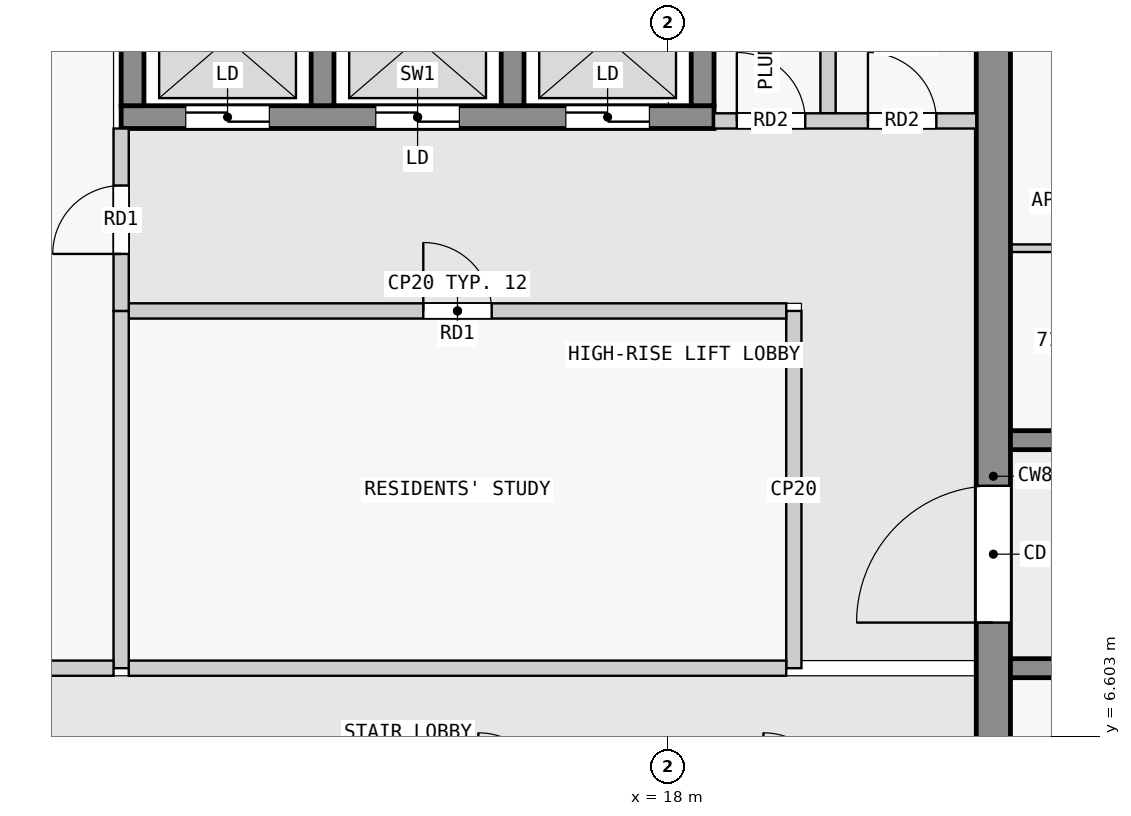
"""IFC4 building model, lengths in metres.
Left out: names, types, materials, properties, quantities, classifications, styles, units other than length and angle.
Written with IfcOpenShell. Run it as: python <this file> out.ifc"""

import sys

from ifc_helpers import new_model, si_unit, direction, frame, frame_2d, origin, place, context, subcontext, project, spatial, rectangle, extrude, element, fill, save


model = new_model("IFC4")
c1 = context("Model", 3, precision=1e-05, world=origin(), true_north=direction((0.0, 1.0)))
c2 = subcontext(c1, "Body", "Model", "MODEL_VIEW")
j1 = project(units=[si_unit("LENGTHUNIT", "METRE"), si_unit("PLANEANGLEUNIT", "RADIAN")], contexts=[c1])
p1 = place(None, origin())
s1 = spatial("IfcSite", under=j1, at=p1, CompositionType="ELEMENT")
p2 = place(p1, origin())
s2 = spatial("IfcBuilding", under=s1, at=p2, CompositionType="ELEMENT")
p3 = place(p2, frame((0.0, 0.0, 270.4)))
s3 = spatial("IfcBuildingStorey", under=s2, at=p3, CompositionType="ELEMENT", Elevation=270.4)
p4 = place(p3, frame((22.275, 2.5, 0.0), z_axis=(0.0, 0.0, 1.0), x_axis=(0.0, 1.0, 0.0)))
e1 = element("IfcWall", 1, at=p4, inside=s3, PredefinedType="SHEAR", context=c2, shape_type="SweptSolid", body=[
    extrude(rectangle(XDim=15.05, YDim=0.45, at=frame_2d((7.525, 0.0))), origin(), (0.0, 0.0, 1.0), 3.25),
])
p5 = place(p4, frame((5.6, 0.0, 0.0)))
e2 = element("IfcOpeningElement", 2, at=p5, cuts=e1, PredefinedType="OPENING", context=c2, shape_type="SweptSolid", body=[
    extrude(rectangle(XDim=1.8, YDim=2.1, at=frame_2d((0.9, 1.05))), frame((0.0, 0.235, 0.0), z_axis=(0.0, -1.0, 0.0), x_axis=(1.0, 0.0, 0.0)), (0.0, 0.0, 1.0), 0.47),
])
p6 = place(p3, frame((10.8, 14.75, 0.0), z_axis=(0.0, 0.0, 1.0), x_axis=(1.0, 0.0, 0.0)))
e3 = element("IfcWall", 3, at=p6, inside=s3, PredefinedType="SHEAR", context=c2, shape_type="SweptSolid", body=[
    extrude(rectangle(XDim=7.8, YDim=0.3, at=frame_2d((3.9, 0.0))), origin(), (0.0, 0.0, 1.0), 3.25),
])
p7 = place(p6, frame((0.85, 0.0, 0.0)))
e4 = element("IfcOpeningElement", 4, at=p7, cuts=e3, PredefinedType="OPENING", context=c2, shape_type="SweptSolid", body=[
    extrude(rectangle(XDim=1.1, YDim=2.1, at=frame_2d((0.55, 1.05))), frame((0.0, 0.16, 0.0), z_axis=(0.0, -1.0, 0.0), x_axis=(1.0, 0.0, 0.0)), (0.0, 0.0, 1.0), 0.32),
])
p8 = place(p6, frame((3.35, 0.0, 0.0)))
e5 = element("IfcOpeningElement", 5, at=p8, cuts=e3, PredefinedType="OPENING", context=c2, shape_type="SweptSolid", body=[
    extrude(rectangle(XDim=1.1, YDim=2.1, at=frame_2d((0.55, 1.05))), frame((0.0, 0.16, 0.0), z_axis=(0.0, -1.0, 0.0), x_axis=(1.0, 0.0, 0.0)), (0.0, 0.0, 1.0), 0.32),
])
p9 = place(p6, frame((5.85, 0.0, 0.0)))
e6 = element("IfcOpeningElement", 6, at=p9, cuts=e3, PredefinedType="OPENING", context=c2, shape_type="SweptSolid", body=[
    extrude(rectangle(XDim=1.1, YDim=2.1, at=frame_2d((0.55, 1.05))), frame((0.0, 0.16, 0.0), z_axis=(0.0, -1.0, 0.0), x_axis=(1.0, 0.0, 0.0)), (0.0, 0.0, 1.0), 0.32),
])
for number, where, z_axis, x_axis in (
    (7, (10.95, 14.9, 0.0), (0.0, 0.0, 1.0), (0.0, 1.0, 0.0)),
    (8, (13.45, 14.9, 0.0), (0.0, 0.0, 1.0), (0.0, 1.0, 0.0)),
    (9, (15.95, 14.9, 0.0), (0.0, 0.0, 1.0), (0.0, 1.0, 0.0)),
    (10, (18.45, 14.9, 0.0), (0.0, 0.0, 1.0), (0.0, 1.0, 0.0)),
):
    element("IfcWall", number, at=place(p3, frame(where, z_axis=z_axis, x_axis=x_axis)), inside=s3, PredefinedType="SHEAR", context=c2, shape_type="SweptSolid", body=[
        extrude(rectangle(XDim=2.0, YDim=0.3, at=frame_2d((1.0, 0.0))), origin(), (0.0, 0.0, 1.0), 3.25),
    ])
p10 = place(p3, frame((22.5, 7.5, 0.0), z_axis=(0.0, 0.0, 1.0), x_axis=(1.0, 0.0, 0.0)))
e11 = element("IfcWall", 11, at=p10, inside=s3, PredefinedType="SHEAR", context=c2, shape_type="SweptSolid", body=[
    extrude(rectangle(XDim=22.5, YDim=0.25, at=frame_2d((11.25, 0.0))), origin(), (0.0, 0.0, 1.0), 3.25),
])
p11 = place(p10, frame((1.75, 0.0, 0.0)))
e12 = element("IfcOpeningElement", 12, at=p11, cuts=e11, PredefinedType="OPENING", context=c2, shape_type="SweptSolid", body=[
    extrude(rectangle(XDim=1.0, YDim=2.1, at=frame_2d((0.5, 1.05))), frame((0.0, 0.135, 0.0), z_axis=(0.0, -1.0, 0.0), x_axis=(1.0, 0.0, 0.0)), (0.0, 0.0, 1.0), 0.27),
])
p12 = place(p10, frame((6.25, 0.0, 0.0)))
e13 = element("IfcOpeningElement", 13, at=p12, cuts=e11, PredefinedType="OPENING", context=c2, shape_type="SweptSolid", body=[
    extrude(rectangle(XDim=1.0, YDim=2.1, at=frame_2d((0.5, 1.05))), frame((0.0, 0.135, 0.0), z_axis=(0.0, -1.0, 0.0), x_axis=(1.0, 0.0, 0.0)), (0.0, 0.0, 1.0), 0.27),
])
p13 = place(p10, frame((10.35, 0.0, 0.0)))
e14 = element("IfcOpeningElement", 14, at=p13, cuts=e11, PredefinedType="OPENING", context=c2, shape_type="SweptSolid", body=[
    extrude(rectangle(XDim=1.8, YDim=2.1, at=frame_2d((0.9, 1.05))), frame((0.0, 0.135, 0.0), z_axis=(0.0, -1.0, 0.0), x_axis=(1.0, 0.0, 0.0)), (0.0, 0.0, 1.0), 0.27),
])
p14 = place(p10, frame((15.25, 0.0, 0.0)))
e15 = element("IfcOpeningElement", 15, at=p14, cuts=e11, PredefinedType="OPENING", context=c2, shape_type="SweptSolid", body=[
    extrude(rectangle(XDim=1.0, YDim=2.1, at=frame_2d((0.5, 1.05))), frame((0.0, 0.135, 0.0), z_axis=(0.0, -1.0, 0.0), x_axis=(1.0, 0.0, 0.0)), (0.0, 0.0, 1.0), 0.27),
])
p15 = place(p10, frame((18.75, 0.0, 0.0)))
e16 = element("IfcOpeningElement", 16, at=p15, cuts=e11, PredefinedType="OPENING", context=c2, shape_type="SweptSolid", body=[
    extrude(rectangle(XDim=0.9, YDim=2.1, at=frame_2d((0.45, 1.05))), frame((0.0, 0.135, 0.0), z_axis=(0.0, -1.0, 0.0), x_axis=(1.0, 0.0, 0.0)), (0.0, 0.0, 1.0), 0.27),
])
p16 = place(p10, frame((20.95, 0.0, 0.0)))
e17 = element("IfcOpeningElement", 17, at=p16, cuts=e11, PredefinedType="OPENING", context=c2, shape_type="SweptSolid", body=[
    extrude(rectangle(XDim=1.0, YDim=2.1, at=frame_2d((0.5, 1.05))), frame((0.0, 0.135, 0.0), z_axis=(0.0, -1.0, 0.0), x_axis=(1.0, 0.0, 0.0)), (0.0, 0.0, 1.0), 0.27),
])
p17 = place(p3, frame((22.5, 10.5, 0.0), z_axis=(0.0, 0.0, 1.0), x_axis=(1.0, 0.0, 0.0)))
e18 = element("IfcWall", 18, at=p17, inside=s3, PredefinedType="SHEAR", context=c2, shape_type="SweptSolid", body=[
    extrude(rectangle(XDim=22.5, YDim=0.25, at=frame_2d((11.25, 0.0))), origin(), (0.0, 0.0, 1.0), 3.25),
])
p18 = place(p17, frame((1.75, 0.0, 0.0)))
e19 = element("IfcOpeningElement", 19, at=p18, cuts=e18, PredefinedType="OPENING", context=c2, shape_type="SweptSolid", body=[
    extrude(rectangle(XDim=1.0, YDim=2.1, at=frame_2d((0.5, 1.05))), frame((0.0, 0.135, 0.0), z_axis=(0.0, -1.0, 0.0), x_axis=(1.0, 0.0, 0.0)), (0.0, 0.0, 1.0), 0.27),
])
p19 = place(p17, frame((8.55, 0.0, 0.0)))
e20 = element("IfcOpeningElement", 20, at=p19, cuts=e18, PredefinedType="OPENING", context=c2, shape_type="SweptSolid", body=[
    extrude(rectangle(XDim=1.0, YDim=2.1, at=frame_2d((0.5, 1.05))), frame((0.0, 0.135, 0.0), z_axis=(0.0, -1.0, 0.0), x_axis=(1.0, 0.0, 0.0)), (0.0, 0.0, 1.0), 0.27),
])
p20 = place(p17, frame((16.85, 0.0, 0.0)))
e21 = element("IfcOpeningElement", 21, at=p20, cuts=e18, PredefinedType="OPENING", context=c2, shape_type="SweptSolid", body=[
    extrude(rectangle(XDim=1.0, YDim=2.1, at=frame_2d((0.5, 1.05))), frame((0.0, 0.135, 0.0), z_axis=(0.0, -1.0, 0.0), x_axis=(1.0, 0.0, 0.0)), (0.0, 0.0, 1.0), 0.27),
])
p21 = place(p3, frame((7.1, 7.5, 0.0), z_axis=(0.0, 0.0, 1.0), x_axis=(1.0, 0.0, 0.0)))
e22 = element("IfcWall", 22, at=p21, inside=s3, PredefinedType="PARTITIONING", context=c2, shape_type="SweptSolid", body=[
    extrude(rectangle(XDim=3.6, YDim=0.2, at=frame_2d((1.8, 0.0))), origin(), (0.0, 0.0, 1.0), 3.25),
])
p22 = place(p3, frame((10.8, 12.2, 0.0), z_axis=(0.0, 0.0, 1.0), x_axis=(0.0, 1.0, 0.0)))
e23 = element("IfcWall", 23, at=p22, inside=s3, PredefinedType="PARTITIONING", context=c2, shape_type="SweptSolid", body=[
    extrude(rectangle(XDim=2.4, YDim=0.2, at=frame_2d((1.2, 0.0))), origin(), (0.0, 0.0, 1.0), 3.25),
])
p23 = place(p22, frame((0.75, 0.0, 0.0)))
e24 = element("IfcOpeningElement", 24, at=p23, cuts=e23, PredefinedType="OPENING", context=c2, shape_type="SweptSolid", body=[
    extrude(rectangle(XDim=0.9, YDim=2.1, at=frame_2d((0.45, 1.05))), frame((0.0, 0.11, 0.0), z_axis=(0.0, -1.0, 0.0), x_axis=(1.0, 0.0, 0.0)), (0.0, 0.0, 1.0), 0.22),
])
p24 = place(p3, frame((10.8, 7.5, 0.0), z_axis=(0.0, 0.0, 1.0), x_axis=(0.0, 1.0, 0.0)))
e25 = element("IfcWall", 25, at=p24, inside=s3, PredefinedType="PARTITIONING", context=c2, shape_type="SweptSolid", body=[
    extrude(rectangle(XDim=4.7, YDim=0.2, at=frame_2d((2.35, 0.0))), origin(), (0.0, 0.0, 1.0), 3.25),
])
p25 = place(p3, frame((10.9, 7.5, 0.0), z_axis=(0.0, 0.0, 1.0), x_axis=(1.0, 0.0, 0.0)))
e26 = element("IfcWall", 26, at=p25, inside=s3, PredefinedType="PARTITIONING", context=c2, shape_type="SweptSolid", body=[
    extrude(rectangle(XDim=8.65, YDim=0.2, at=frame_2d((4.325, 0.0))), origin(), (0.0, 0.0, 1.0), 3.25),
])
p26 = place(p3, frame((19.65, 7.5, 0.0), z_axis=(0.0, 0.0, 1.0), x_axis=(0.0, 1.0, 0.0)))
e27 = element("IfcWall", 27, at=p26, inside=s3, PredefinedType="PARTITIONING", context=c2, shape_type="SweptSolid", body=[
    extrude(rectangle(XDim=4.7, YDim=0.2, at=frame_2d((2.35, 0.0))), origin(), (0.0, 0.0, 1.0), 3.25),
])
p27 = place(p3, frame((10.9, 12.2, 0.0), z_axis=(0.0, 0.0, 1.0), x_axis=(1.0, 0.0, 0.0)))
e28 = element("IfcWall", 28, at=p27, inside=s3, PredefinedType="PARTITIONING", context=c2, shape_type="SweptSolid", body=[
    extrude(rectangle(XDim=8.65, YDim=0.2, at=frame_2d((4.325, 0.0))), origin(), (0.0, 0.0, 1.0), 3.25),
])
p28 = place(p27, frame((3.875, 0.0, 0.0)))
e29 = element("IfcOpeningElement", 29, at=p28, cuts=e28, PredefinedType="OPENING", context=c2, shape_type="SweptSolid", body=[
    extrude(rectangle(XDim=0.9, YDim=2.1, at=frame_2d((0.45, 1.05))), frame((0.0, 0.11, 0.0), z_axis=(0.0, -1.0, 0.0), x_axis=(1.0, 0.0, 0.0)), (0.0, 0.0, 1.0), 0.22),
])
p29 = place(p3, frame((18.6, 14.7, 0.0), z_axis=(0.0, 0.0, 1.0), x_axis=(1.0, 0.0, 0.0)))
e30 = element("IfcWall", 30, at=p29, inside=s3, PredefinedType="PARTITIONING", context=c2, shape_type="SweptSolid", body=[
    extrude(rectangle(XDim=3.45, YDim=0.2, at=frame_2d((1.725, 0.0))), origin(), (0.0, 0.0, 1.0), 3.25),
])
p30 = place(p29, frame((0.3, 0.0, 0.0)))
e31 = element("IfcOpeningElement", 31, at=p30, cuts=e30, PredefinedType="OPENING", context=c2, shape_type="SweptSolid", body=[
    extrude(rectangle(XDim=0.9, YDim=2.1, at=frame_2d((0.45, 1.05))), frame((0.0, 0.11, 0.0), z_axis=(0.0, -1.0, 0.0), x_axis=(1.0, 0.0, 0.0)), (0.0, 0.0, 1.0), 0.22),
])
p31 = place(p29, frame((2.025, 0.0, 0.0)))
e32 = element("IfcOpeningElement", 32, at=p31, cuts=e30, PredefinedType="OPENING", context=c2, shape_type="SweptSolid", body=[
    extrude(rectangle(XDim=0.9, YDim=2.1, at=frame_2d((0.45, 1.05))), frame((0.0, 0.11, 0.0), z_axis=(0.0, -1.0, 0.0), x_axis=(1.0, 0.0, 0.0)), (0.0, 0.0, 1.0), 0.22),
])
p32 = place(p3, frame((20.1, 14.8, 0.0), z_axis=(0.0, 0.0, 1.0), x_axis=(0.0, 1.0, 0.0)))
e33 = element("IfcWall", 33, at=p32, inside=s3, PredefinedType="PARTITIONING", context=c2, shape_type="SweptSolid", body=[
    extrude(rectangle(XDim=2.75, YDim=0.2, at=frame_2d((1.375, 0.0))), origin(), (0.0, 0.0, 1.0), 3.25),
])
p33 = place(p3, frame((23.95, 13.025, 0.0), z_axis=(0.0, 0.0, 1.0), x_axis=(-1.0, 0.0, 0.0)))
e34 = element("IfcWall", 34, at=p33, inside=s3, PredefinedType="PARTITIONING", context=c2, shape_type="SweptSolid", body=[
    extrude(rectangle(XDim=1.45, YDim=0.1, at=frame_2d((0.725, 0.0))), origin(), (0.0, 0.0, 1.0), 3.25),
])
p34 = place(p23, origin())
e35 = element("IfcDoor", 35, at=p34, inside=s3, OperationType="SINGLE_SWING_LEFT", PredefinedType="DOOR", context=c2, shape_type="SweptSolid", body=[
    extrude(rectangle(XDim=0.9, YDim=2.1, at=frame_2d((0.45, 1.05))), frame((0.0, 0.025, 0.0), z_axis=(0.0, -1.0, 0.0), x_axis=(1.0, 0.0, 0.0)), (0.0, 0.0, 1.0), 0.05),
])
fill(e24, e35)
p35 = place(p28, origin())
e36 = element("IfcDoor", 36, at=p35, inside=s3, OperationType="SINGLE_SWING_LEFT", PredefinedType="DOOR", context=c2, shape_type="SweptSolid", body=[
    extrude(rectangle(XDim=0.9, YDim=2.1, at=frame_2d((0.45, 1.05))), frame((0.0, 0.025, 0.0), z_axis=(0.0, -1.0, 0.0), x_axis=(1.0, 0.0, 0.0)), (0.0, 0.0, 1.0), 0.05),
])
fill(e29, e36)
p36 = place(p7, origin())
e37 = element("IfcDoor", 37, at=p36, inside=s3, OperationType="DOUBLE_DOOR_SLIDING", PredefinedType="DOOR", context=c2, shape_type="SweptSolid", body=[
    extrude(rectangle(XDim=1.1, YDim=2.1, at=frame_2d((0.55, 1.05))), frame((0.0, 0.025, 0.0), z_axis=(0.0, -1.0, 0.0), x_axis=(1.0, 0.0, 0.0)), (0.0, 0.0, 1.0), 0.05),
])
fill(e4, e37)
p37 = place(p8, origin())
e38 = element("IfcDoor", 38, at=p37, inside=s3, OperationType="DOUBLE_DOOR_SLIDING", PredefinedType="DOOR", context=c2, shape_type="SweptSolid", body=[
    extrude(rectangle(XDim=1.1, YDim=2.1, at=frame_2d((0.55, 1.05))), frame((0.0, 0.025, 0.0), z_axis=(0.0, -1.0, 0.0), x_axis=(1.0, 0.0, 0.0)), (0.0, 0.0, 1.0), 0.05),
])
fill(e5, e38)
p38 = place(p9, origin())
e39 = element("IfcDoor", 39, at=p38, inside=s3, OperationType="DOUBLE_DOOR_SLIDING", PredefinedType="DOOR", context=c2, shape_type="SweptSolid", body=[
    extrude(rectangle(XDim=1.1, YDim=2.1, at=frame_2d((0.55, 1.05))), frame((0.0, 0.025, 0.0), z_axis=(0.0, -1.0, 0.0), x_axis=(1.0, 0.0, 0.0)), (0.0, 0.0, 1.0), 0.05),
])
fill(e6, e39)
p39 = place(p5, origin())
e40 = element("IfcDoor", 40, at=p39, inside=s3, OperationType="DOUBLE_DOOR_SINGLE_SWING", PredefinedType="DOOR", context=c2, shape_type="SweptSolid", body=[
    extrude(rectangle(XDim=1.8, YDim=2.1, at=frame_2d((0.9, 1.05))), frame((0.0, 0.025, 0.0), z_axis=(0.0, -1.0, 0.0), x_axis=(1.0, 0.0, 0.0)), (0.0, 0.0, 1.0), 0.05),
])
fill(e2, e40)
p40 = place(p30, origin())
e41 = element("IfcDoor", 41, at=p40, inside=s3, OperationType="SINGLE_SWING_LEFT", PredefinedType="DOOR", context=c2, shape_type="SweptSolid", body=[
    extrude(rectangle(XDim=0.9, YDim=2.1, at=frame_2d((0.45, 1.05))), frame((0.0, 0.025, 0.0), z_axis=(0.0, -1.0, 0.0), x_axis=(1.0, 0.0, 0.0)), (0.0, 0.0, 1.0), 0.05),
])
fill(e31, e41)
p41 = place(p31, origin())
e42 = element("IfcDoor", 42, at=p41, inside=s3, OperationType="SINGLE_SWING_LEFT", PredefinedType="DOOR", context=c2, shape_type="SweptSolid", body=[
    extrude(rectangle(XDim=0.9, YDim=2.1, at=frame_2d((0.45, 1.05))), frame((0.0, 0.025, 0.0), z_axis=(0.0, -1.0, 0.0), x_axis=(1.0, 0.0, 0.0)), (0.0, 0.0, 1.0), 0.05),
])
fill(e32, e42)
save(model, sys.argv[1])
